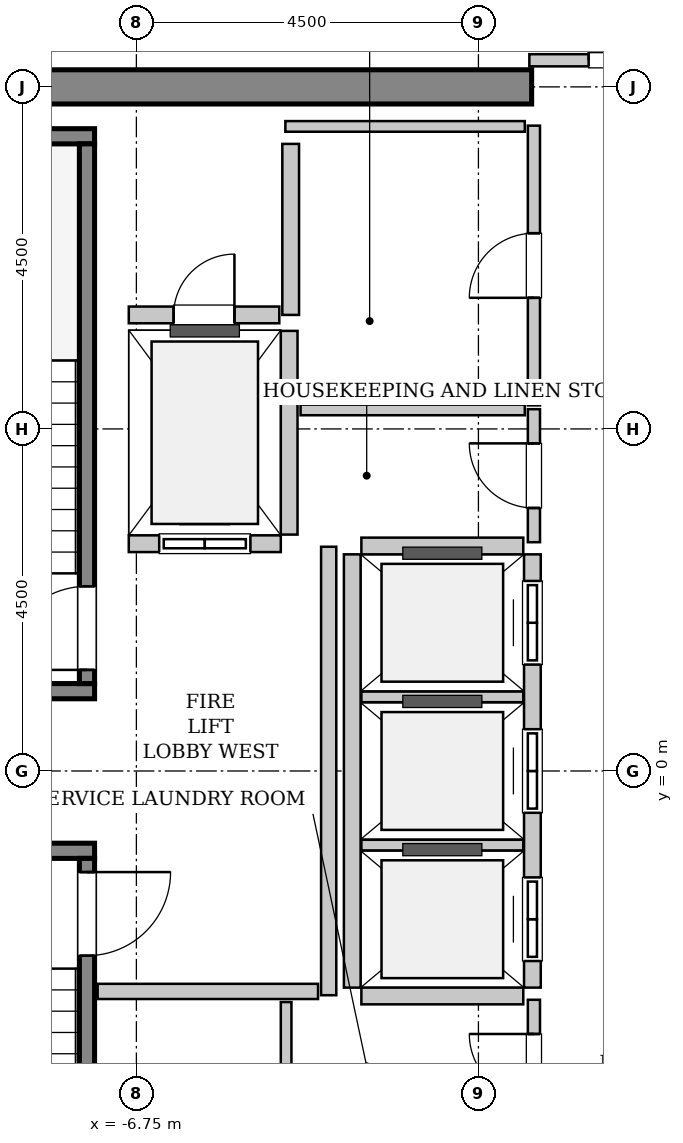
"""IFC4 building model, lengths in metres.
Left out: names, types, materials, properties, quantities, classifications, styles, units other than length and angle.
Written with IfcOpenShell. Run it as: python <this file> out.ifc"""

import sys

from ifc_helpers import new_model, si_unit, direction, frame, frame_2d, origin, place, context, subcontext, project, spatial, rectangle, extrude, source, transform, mapped, element, fill, save


model = new_model("IFC4")
c1 = context("Model", 3, precision=1e-05, world=origin(), true_north=direction((0.0, 1.0)))
c2 = subcontext(c1, "Body", "Model", "MODEL_VIEW")
j1 = project(units=[si_unit("LENGTHUNIT", "METRE"), si_unit("PLANEANGLEUNIT", "RADIAN")], contexts=[c1])
p1 = place(None, origin())
s1 = spatial("IfcSite", under=j1, at=p1, CompositionType="ELEMENT")
p2 = place(p1, origin())
s2 = spatial("IfcBuilding", under=s1, at=p2, CompositionType="ELEMENT")
p3 = place(p2, frame((0.0, 0.0, 314.0)))
s3 = spatial("IfcBuildingStorey", under=s2, at=p3, CompositionType="ELEMENT", Elevation=314.0)
m1 = source(origin(), c2, "Body", "SweptSolid", [
    extrude(rectangle(XDim=9.925, YDim=0.45, at=frame_2d((4.962, 0.0))), origin(), (0.0, 0.0, 1.0), 3.8),
])
p4 = place(p3, frame((-11.475, 9.0, 0.0), z_axis=(0.0, 0.0, 1.0), x_axis=(1.0, 0.0, 0.0)))
e1 = element("IfcWall", 1, at=p4, inside=s3, PredefinedType="SHEAR", context=c2, shape_type="MappedRepresentation", body=[
    mapped(m1, transform((0.0, 0.0, 0.0), x_axis=(1.0, 0.0, 0.0), y_axis=(0.0, 1.0, 0.0), z_axis=(0.0, 0.0, 1.0), scale=1.0)),
])
m2 = source(origin(), c2, "Body", "SweptSolid", [
    extrude(rectangle(XDim=3.4, YDim=0.2, at=frame_2d((1.7, 0.0))), origin(), (0.0, 0.0, 1.0), 3.8),
])
p5 = place(p3, frame((-7.3, 1.05, 0.0), z_axis=(0.0, 0.0, 1.0), x_axis=(-1.0, 0.0, 0.0)))
e2 = element("IfcWall", 2, at=p5, inside=s3, PredefinedType="SOLIDWALL", context=c2, shape_type="MappedRepresentation", body=[
    mapped(m2, transform((0.0, 0.0, 0.0), x_axis=(1.0, 0.0, 0.0), y_axis=(0.0, 1.0, 0.0), z_axis=(0.0, 0.0, 1.0), scale=1.0)),
])
m3 = source(origin(), c2, "Body", "SweptSolid", [
    extrude(rectangle(XDim=3.73, YDim=0.2, at=frame_2d((1.865, 0.0))), origin(), (0.0, 0.0, 1.0), 3.8),
])
p6 = place(p3, frame((-7.3, 8.35, 0.0), z_axis=(0.0, 0.0, 1.0), x_axis=(-1.0, 0.0, 0.0)))
e3 = element("IfcWall", 3, at=p6, inside=s3, PredefinedType="SOLIDWALL", context=c2, shape_type="MappedRepresentation", body=[
    mapped(m3, transform((0.0, 0.0, 0.0), x_axis=(1.0, 0.0, 0.0), y_axis=(0.0, 1.0, 0.0), z_axis=(0.0, 0.0, 1.0), scale=1.0)),
])
m4 = source(origin(), c2, "Body", "SweptSolid", [
    extrude(rectangle(XDim=7.1, YDim=0.2, at=frame_2d((3.55, 0.0))), origin(), (0.0, 0.0, 1.0), 3.8),
])
p7 = place(p3, frame((-7.4, 1.15, 0.0), z_axis=(0.0, 0.0, 1.0), x_axis=(0.0, 1.0, 0.0)))
e4 = element("IfcWall", 4, at=p7, inside=s3, PredefinedType="SOLIDWALL", context=c2, shape_type="MappedRepresentation", body=[
    mapped(m4, transform((0.0, 0.0, 0.0), x_axis=(1.0, 0.0, 0.0), y_axis=(0.0, 1.0, 0.0), z_axis=(0.0, 0.0, 1.0), scale=1.0)),
])
p8 = place(p7, frame((0.18, 0.0, 0.0)))
e5 = element("IfcOpeningElement", 5, at=p8, cuts=e4, PredefinedType="OPENING", context=c2, shape_type="SweptSolid", body=[
    extrude(rectangle(XDim=1.1, YDim=2.15, at=frame_2d((0.55, 1.075))), frame((0.0, 0.11, 0.0), z_axis=(0.0, -1.0, 0.0), x_axis=(1.0, 0.0, 0.0)), (0.0, 0.0, 1.0), 0.22),
])
p9 = place(p3, frame((-10.7, -1.05, 0.0), z_axis=(0.0, 0.0, 1.0), x_axis=(1.0, 0.0, 0.0)))
e6 = element("IfcWall", 6, at=p9, inside=s3, PredefinedType="SOLIDWALL", context=c2, shape_type="MappedRepresentation", body=[
    mapped(m2, transform((0.0, 0.0, 0.0), x_axis=(1.0, 0.0, 0.0), y_axis=(0.0, 1.0, 0.0), z_axis=(0.0, 0.0, 1.0), scale=1.0)),
])
p10 = place(p3, frame((-7.4, -1.15, 0.0), z_axis=(0.0, 0.0, 1.0), x_axis=(0.0, -1.0, 0.0)))
e7 = element("IfcWall", 7, at=p10, inside=s3, PredefinedType="SOLIDWALL", context=c2, shape_type="MappedRepresentation", body=[
    mapped(m4, transform((0.0, 0.0, 0.0), x_axis=(1.0, 0.0, 0.0), y_axis=(0.0, 1.0, 0.0), z_axis=(0.0, 0.0, 1.0), scale=1.0)),
])
p11 = place(p10, frame((0.18, 0.0, 0.0)))
e8 = element("IfcOpeningElement", 8, at=p11, cuts=e7, PredefinedType="OPENING", context=c2, shape_type="SweptSolid", body=[
    extrude(rectangle(XDim=1.1, YDim=2.15, at=frame_2d((0.55, 1.075))), frame((0.0, 0.11, 0.0), z_axis=(0.0, -1.0, 0.0), x_axis=(1.0, 0.0, 0.0)), (0.0, 0.0, 1.0), 0.22),
])
m5 = source(origin(), c2, "Body", "SweptSolid", [
    extrude(rectangle(XDim=2.0, YDim=0.22, at=frame_2d((1.0, 0.0))), origin(), (0.0, 0.0, 1.0), 3.485),
])
p12 = place(p3, frame((-6.85, 2.99, 0.0), z_axis=(0.0, 0.0, 1.0), x_axis=(1.0, 0.0, 0.0)))
e9 = element("IfcWall", 9, at=p12, inside=s3, PredefinedType="SOLIDWALL", context=c2, shape_type="MappedRepresentation", body=[
    mapped(m5, transform((0.0, 0.0, 0.0), x_axis=(1.0, 0.0, 0.0), y_axis=(0.0, 1.0, 0.0), z_axis=(0.0, 0.0, 1.0), scale=1.0)),
])
p13 = place(p12, frame((0.4, 0.0, 0.0)))
e10 = element("IfcOpeningElement", 10, at=p13, cuts=e9, PredefinedType="OPENING", context=c2, shape_type="SweptSolid", body=[
    extrude(rectangle(XDim=1.2, YDim=2.2, at=frame_2d((0.6, 1.1))), frame((0.0, 0.12, 0.0), z_axis=(0.0, -1.0, 0.0), x_axis=(1.0, 0.0, 0.0)), (0.0, 0.0, 1.0), 0.24),
])
m6 = source(origin(), c2, "Body", "SweptSolid", [
    extrude(rectangle(XDim=2.68, YDim=0.22, at=frame_2d((1.34, 0.0))), origin(), (0.0, 0.0, 1.0), 3.485),
])
p14 = place(p3, frame((-4.74, 3.11, 0.0), z_axis=(0.0, 0.0, 1.0), x_axis=(0.0, 1.0, 0.0)))
e11 = element("IfcWall", 11, at=p14, inside=s3, PredefinedType="SOLIDWALL", context=c2, shape_type="MappedRepresentation", body=[
    mapped(m6, transform((0.0, 0.0, 0.0), x_axis=(1.0, 0.0, 0.0), y_axis=(0.0, 1.0, 0.0), z_axis=(0.0, 0.0, 1.0), scale=1.0)),
])
m7 = source(origin(), c2, "Body", "SweptSolid", [
    extrude(rectangle(XDim=5.7, YDim=0.22, at=frame_2d((2.85, 0.0))), origin(), (0.0, 0.0, 1.0), 3.485),
])
p15 = place(p3, frame((-1.54, -2.85, 0.0), z_axis=(0.0, 0.0, 1.0), x_axis=(0.0, 1.0, 0.0)))
e12 = element("IfcWall", 12, at=p15, inside=s3, PredefinedType="SOLIDWALL", context=c2, shape_type="MappedRepresentation", body=[
    mapped(m7, transform((0.0, 0.0, 0.0), x_axis=(1.0, 0.0, 0.0), y_axis=(0.0, 1.0, 0.0), z_axis=(0.0, 0.0, 1.0), scale=1.0)),
])
p16 = place(p15, frame((0.35, 0.0, 0.0)))
e13 = element("IfcOpeningElement", 13, at=p16, cuts=e12, PredefinedType="OPENING", context=c2, shape_type="SweptSolid", body=[
    extrude(rectangle(XDim=1.1, YDim=2.2, at=frame_2d((0.55, 1.1))), frame((0.0, 0.12, 0.0), z_axis=(0.0, -1.0, 0.0), x_axis=(1.0, 0.0, 0.0)), (0.0, 0.0, 1.0), 0.24),
])
p17 = place(p15, frame((2.3, 0.0, 0.0)))
e14 = element("IfcOpeningElement", 14, at=p17, cuts=e12, PredefinedType="OPENING", context=c2, shape_type="SweptSolid", body=[
    extrude(rectangle(XDim=1.1, YDim=2.2, at=frame_2d((0.55, 1.1))), frame((0.0, 0.12, 0.0), z_axis=(0.0, -1.0, 0.0), x_axis=(1.0, 0.0, 0.0)), (0.0, 0.0, 1.0), 0.24),
])
p18 = place(p15, frame((4.25, 0.0, 0.0)))
e15 = element("IfcOpeningElement", 15, at=p18, cuts=e12, PredefinedType="OPENING", context=c2, shape_type="SweptSolid", body=[
    extrude(rectangle(XDim=1.1, YDim=2.2, at=frame_2d((0.55, 1.1))), frame((0.0, 0.12, 0.0), z_axis=(0.0, -1.0, 0.0), x_axis=(1.0, 0.0, 0.0)), (0.0, 0.0, 1.0), 0.24),
])
p19 = place(p3, frame((-3.91, 2.85, 0.0), z_axis=(0.0, 0.0, 1.0), x_axis=(0.0, -1.0, 0.0)))
e16 = element("IfcWall", 16, at=p19, inside=s3, PredefinedType="SOLIDWALL", context=c2, shape_type="MappedRepresentation", body=[
    mapped(m7, transform((0.0, 0.0, 0.0), x_axis=(1.0, 0.0, 0.0), y_axis=(0.0, 1.0, 0.0), z_axis=(0.0, 0.0, 1.0), scale=1.0)),
])
m8 = source(origin(), c2, "Body", "SweptSolid", [
    extrude(rectangle(XDim=2.13, YDim=0.22, at=frame_2d((1.065, 0.0))), origin(), (0.0, 0.0, 1.0), 3.485),
])
p20 = place(p3, frame((-3.79, -2.96, 0.0), z_axis=(0.0, 0.0, 1.0), x_axis=(1.0, 0.0, 0.0)))
e17 = element("IfcWall", 17, at=p20, inside=s3, PredefinedType="SOLIDWALL", context=c2, shape_type="MappedRepresentation", body=[
    mapped(m8, transform((0.0, 0.0, 0.0), x_axis=(1.0, 0.0, 0.0), y_axis=(0.0, 1.0, 0.0), z_axis=(0.0, 0.0, 1.0), scale=1.0)),
])
m9 = source(origin(), c2, "Body", "SweptSolid", [
    extrude(rectangle(XDim=2.13, YDim=0.14, at=frame_2d((1.065, 0.0))), origin(), (0.0, 0.0, 1.0), 3.485),
])
for number, where, z_axis, x_axis in (
    (18, (-3.79, -0.975, 0.0), (0.0, 0.0, 1.0), (1.0, 0.0, 0.0)),
    (19, (-3.79, 0.975, 0.0), (0.0, 0.0, 1.0), (1.0, 0.0, 0.0)),
):
    element("IfcWall", number, at=place(p3, frame(where, z_axis=z_axis, x_axis=x_axis)), inside=s3, PredefinedType="PARTITIONING", context=c2, shape_type="MappedRepresentation", body=[
        mapped(m9, transform((0.0, 0.0, 0.0), x_axis=(1.0, 0.0, 0.0), y_axis=(0.0, 1.0, 0.0), z_axis=(0.0, 0.0, 1.0), scale=1.0)),
    ])
p21 = place(p3, frame((-1.66, 2.96, 0.0), z_axis=(0.0, 0.0, 1.0), x_axis=(-1.0, 0.0, 0.0)))
e20 = element("IfcWall", 20, at=p21, inside=s3, PredefinedType="SOLIDWALL", context=c2, shape_type="MappedRepresentation", body=[
    mapped(m8, transform((0.0, 0.0, 0.0), x_axis=(1.0, 0.0, 0.0), y_axis=(0.0, 1.0, 0.0), z_axis=(0.0, 0.0, 1.0), scale=1.0)),
])
m10 = source(origin(), c2, "Body", "SweptSolid", [
    extrude(rectangle(XDim=2.25, YDim=0.22, at=frame_2d((1.125, 0.0))), origin(), (0.0, 0.0, 1.0), 3.485),
])
p22 = place(p3, frame((-4.72, 6.0, 0.0), z_axis=(0.0, 0.0, 1.0), x_axis=(0.0, 1.0, 0.0)))
e21 = element("IfcWall", 21, at=p22, inside=s3, PredefinedType="SOLIDWALL", context=c2, shape_type="MappedRepresentation", body=[
    mapped(m10, transform((0.0, 0.0, 0.0), x_axis=(1.0, 0.0, 0.0), y_axis=(0.0, 1.0, 0.0), z_axis=(0.0, 0.0, 1.0), scale=1.0)),
])
m11 = source(origin(), c2, "Body", "SweptSolid", [
    extrude(rectangle(XDim=1.98, YDim=0.22, at=frame_2d((0.99, 0.0))), origin(), (0.0, 0.0, 1.0), 3.485),
])
p23 = place(p3, frame((-6.85, 6.0, 0.0), z_axis=(0.0, 0.0, 1.0), x_axis=(1.0, 0.0, 0.0)))
e22 = element("IfcWall", 22, at=p23, inside=s3, PredefinedType="SOLIDWALL", context=c2, shape_type="MappedRepresentation", body=[
    mapped(m11, transform((0.0, 0.0, 0.0), x_axis=(1.0, 0.0, 0.0), y_axis=(0.0, 1.0, 0.0), z_axis=(0.0, 0.0, 1.0), scale=1.0)),
])
p24 = place(p23, frame((0.59, 0.0, 0.0)))
e23 = element("IfcOpeningElement", 23, at=p24, cuts=e22, PredefinedType="OPENING", context=c2, shape_type="SweptSolid", body=[
    extrude(rectangle(XDim=0.8, YDim=2.0, at=frame_2d((0.4, 1.0))), frame((0.0, 0.12, 0.0), z_axis=(0.0, -1.0, 0.0), x_axis=(1.0, 0.0, 0.0)), (0.0, 0.0, 1.0), 0.24),
])
m12 = source(origin(), c2, "Body", "SweptSolid", [
    extrude(rectangle(XDim=5.9, YDim=0.2, at=frame_2d((2.95, 0.0))), origin(), (0.0, 0.0, 1.0), 3.485),
])
p25 = place(p3, frame((-4.22, -2.95, 0.0), z_axis=(0.0, 0.0, 1.0), x_axis=(0.0, 1.0, 0.0)))
e24 = element("IfcWall", 24, at=p25, inside=s3, PredefinedType="PARTITIONING", context=c2, shape_type="MappedRepresentation", body=[
    mapped(m12, transform((0.0, 0.0, 0.0), x_axis=(1.0, 0.0, 0.0), y_axis=(0.0, 1.0, 0.0), z_axis=(0.0, 0.0, 1.0), scale=1.0)),
])
m13 = source(origin(), c2, "Body", "SweptSolid", [
    extrude(rectangle(XDim=2.9, YDim=0.2, at=frame_2d((1.45, 0.0))), origin(), (0.0, 0.0, 1.0), 3.485),
])
p26 = place(p3, frame((-7.26, -2.9, 0.0), z_axis=(0.0, 0.0, 1.0), x_axis=(1.0, 0.0, 0.0)))
e25 = element("IfcWall", 25, at=p26, inside=s3, PredefinedType="PARTITIONING", context=c2, shape_type="MappedRepresentation", body=[
    mapped(m13, transform((0.0, 0.0, 0.0), x_axis=(1.0, 0.0, 0.0), y_axis=(0.0, 1.0, 0.0), z_axis=(0.0, 0.0, 1.0), scale=1.0)),
])
m14 = source(origin(), c2, "Body", "SweptSolid", [
    extrude(rectangle(XDim=3.16, YDim=0.16, at=frame_2d((1.58, 0.0))), origin(), (0.0, 0.0, 1.0), 2.575),
])
p27 = place(p3, frame((-1.58, 9.35, 0.0), z_axis=(0.0, 0.0, 1.0), x_axis=(1.0, 0.0, 0.0)))
e26 = element("IfcWall", 26, at=p27, inside=s3, PredefinedType="PARTITIONING", context=c2, shape_type="MappedRepresentation", body=[
    mapped(m14, transform((0.0, 0.0, 0.0), x_axis=(1.0, 0.0, 0.0), y_axis=(0.0, 1.0, 0.0), z_axis=(0.0, 0.0, 1.0), scale=1.0)),
])
p28 = place(p27, frame((0.78, 0.0, 0.0)))
e27 = element("IfcOpeningElement", 27, at=p28, cuts=e26, PredefinedType="OPENING", context=c2, shape_type="SweptSolid", body=[
    extrude(rectangle(XDim=1.6, YDim=2.3, at=frame_2d((0.8, 1.15))), frame((0.0, 0.09, 0.0), z_axis=(0.0, -1.0, 0.0), x_axis=(1.0, 0.0, 0.0)), (0.0, 0.0, 1.0), 0.18),
])
m15 = source(origin(), c2, "Body", "SweptSolid", [
    extrude(rectangle(XDim=1.75, YDim=0.16, at=frame_2d((0.875, 0.0))), origin(), (0.0, 0.0, 1.0), 3.485),
])
p29 = place(p3, frame((-1.52, 3.01, 0.0), z_axis=(0.0, 0.0, 1.0), x_axis=(0.0, 1.0, 0.0)))
e28 = element("IfcWall", 28, at=p29, inside=s3, PredefinedType="PARTITIONING", context=c2, shape_type="MappedRepresentation", body=[
    mapped(m15, transform((0.0, 0.0, 0.0), x_axis=(1.0, 0.0, 0.0), y_axis=(0.0, 1.0, 0.0), z_axis=(0.0, 0.0, 1.0), scale=1.0)),
])
p30 = place(p29, frame((0.45, 0.0, 0.0)))
e29 = element("IfcOpeningElement", 29, at=p30, cuts=e28, PredefinedType="OPENING", context=c2, shape_type="SweptSolid", body=[
    extrude(rectangle(XDim=0.85, YDim=2.1, at=frame_2d((0.425, 1.05))), frame((0.0, 0.09, 0.0), z_axis=(0.0, -1.0, 0.0), x_axis=(1.0, 0.0, 0.0)), (0.0, 0.0, 1.0), 0.18),
])
m16 = source(origin(), c2, "Body", "SweptSolid", [
    extrude(rectangle(XDim=2.95, YDim=0.14, at=frame_2d((1.475, 0.0))), origin(), (0.0, 0.0, 1.0), 3.485),
])
p31 = place(p3, frame((-4.59, 4.75, 0.0), z_axis=(0.0, 0.0, 1.0), x_axis=(1.0, 0.0, 0.0)))
e30 = element("IfcWall", 30, at=p31, inside=s3, PredefinedType="PARTITIONING", context=c2, shape_type="MappedRepresentation", body=[
    mapped(m16, transform((0.0, 0.0, 0.0), x_axis=(1.0, 0.0, 0.0), y_axis=(0.0, 1.0, 0.0), z_axis=(0.0, 0.0, 1.0), scale=1.0)),
])
m17 = source(origin(), c2, "Body", "SweptSolid", [
    extrude(rectangle(XDim=3.68, YDim=0.16, at=frame_2d((1.84, 0.0))), origin(), (0.0, 0.0, 1.0), 3.485),
])
p32 = place(p3, frame((-1.52, 4.81, 0.0), z_axis=(0.0, 0.0, 1.0), x_axis=(0.0, 1.0, 0.0)))
e31 = element("IfcWall", 31, at=p32, inside=s3, PredefinedType="PARTITIONING", context=c2, shape_type="MappedRepresentation", body=[
    mapped(m17, transform((0.0, 0.0, 0.0), x_axis=(1.0, 0.0, 0.0), y_axis=(0.0, 1.0, 0.0), z_axis=(0.0, 0.0, 1.0), scale=1.0)),
])
p33 = place(p32, frame((1.415, 0.0, 0.0)))
e32 = element("IfcOpeningElement", 32, at=p33, cuts=e31, PredefinedType="OPENING", context=c2, shape_type="SweptSolid", body=[
    extrude(rectangle(XDim=0.85, YDim=2.1, at=frame_2d((0.425, 1.05))), frame((0.0, 0.09, 0.0), z_axis=(0.0, -1.0, 0.0), x_axis=(1.0, 0.0, 0.0)), (0.0, 0.0, 1.0), 0.18),
])
m18 = source(origin(), c2, "Body", "SweptSolid", [
    extrude(rectangle(XDim=3.15, YDim=0.14, at=frame_2d((1.575, 0.0))), origin(), (0.0, 0.0, 1.0), 3.485),
])
p34 = place(p3, frame((-4.79, 8.48, 0.0), z_axis=(0.0, 0.0, 1.0), x_axis=(1.0, 0.0, 0.0)))
e33 = element("IfcWall", 33, at=p34, inside=s3, PredefinedType="PARTITIONING", context=c2, shape_type="MappedRepresentation", body=[
    mapped(m18, transform((0.0, 0.0, 0.0), x_axis=(1.0, 0.0, 0.0), y_axis=(0.0, 1.0, 0.0), z_axis=(0.0, 0.0, 1.0), scale=1.0)),
])
p35 = place(p3, frame((-1.52, -4.76, 0.0), z_axis=(0.0, 0.0, 1.0), x_axis=(0.0, 1.0, 0.0)))
e34 = element("IfcWall", 34, at=p35, inside=s3, PredefinedType="PARTITIONING", context=c2, shape_type="MappedRepresentation", body=[
    mapped(m15, transform((0.0, 0.0, 0.0), x_axis=(1.0, 0.0, 0.0), y_axis=(0.0, 1.0, 0.0), z_axis=(0.0, 0.0, 1.0), scale=1.0)),
])
p36 = place(p35, frame((0.45, 0.0, 0.0)))
e35 = element("IfcOpeningElement", 35, at=p36, cuts=e34, PredefinedType="OPENING", context=c2, shape_type="SweptSolid", body=[
    extrude(rectangle(XDim=0.85, YDim=2.1, at=frame_2d((0.425, 1.05))), frame((0.0, 0.09, 0.0), z_axis=(0.0, -1.0, 0.0), x_axis=(1.0, 0.0, 0.0)), (0.0, 0.0, 1.0), 0.18),
])
m19 = source(origin(), c2, "Body", "SweptSolid", [
    extrude(rectangle(XDim=1.6, YDim=0.14, at=frame_2d((0.8, 0.0))), origin(), (0.0, 0.0, 1.0), 3.485),
])
p37 = place(p3, frame((-4.78, -4.64, 0.0), z_axis=(0.0, 0.0, 1.0), x_axis=(0.0, 1.0, 0.0)))
e36 = element("IfcWall", 36, at=p37, inside=s3, PredefinedType="PARTITIONING", context=c2, shape_type="MappedRepresentation", body=[
    mapped(m19, transform((0.0, 0.0, 0.0), x_axis=(1.0, 0.0, 0.0), y_axis=(0.0, 1.0, 0.0), z_axis=(0.0, 0.0, 1.0), scale=1.0)),
])
m20 = source(origin(), c2, "Body", "SweptSolid", [
    extrude(rectangle(XDim=1.1, YDim=2.15, at=frame_2d((0.55, 1.075))), frame((0.0, 0.025, 0.0), z_axis=(0.0, -1.0, 0.0), x_axis=(1.0, 0.0, 0.0)), (0.0, 0.0, 1.0), 0.05),
])
p38 = place(p8, origin())
e37 = element("IfcDoor", 37, at=p38, inside=s3, OperationType="SINGLE_SWING_LEFT", PredefinedType="DOOR", context=c2, shape_type="MappedRepresentation", body=[
    mapped(m20, transform((0.0, 0.0, 0.0), x_axis=(1.0, 0.0, 0.0), y_axis=(0.0, 1.0, 0.0), z_axis=(0.0, 0.0, 1.0), scale=1.0)),
])
fill(e5, e37)
p39 = place(p11, origin())
e38 = element("IfcDoor", 38, at=p39, inside=s3, OperationType="SINGLE_SWING_LEFT", PredefinedType="DOOR", context=c2, shape_type="MappedRepresentation", body=[
    mapped(m20, transform((0.0, 0.0, 0.0), x_axis=(1.0, 0.0, 0.0), y_axis=(0.0, 1.0, 0.0), z_axis=(0.0, 0.0, 1.0), scale=1.0)),
])
fill(e8, e38)
m21 = source(origin(), c2, "Body", "SweptSolid", [
    extrude(rectangle(XDim=1.2, YDim=2.2, at=frame_2d((0.6, 1.1))), frame((0.0, 0.025, 0.0), z_axis=(0.0, -1.0, 0.0), x_axis=(1.0, 0.0, 0.0)), (0.0, 0.0, 1.0), 0.05),
])
p40 = place(p13, origin())
e39 = element("IfcDoor", 39, at=p40, inside=s3, OperationType="SLIDING_TO_LEFT", PredefinedType="DOOR", context=c2, shape_type="MappedRepresentation", body=[
    mapped(m21, transform((0.0, 0.0, 0.0), x_axis=(1.0, 0.0, 0.0), y_axis=(0.0, 1.0, 0.0), z_axis=(0.0, 0.0, 1.0), scale=1.0)),
])
fill(e10, e39)
m22 = source(origin(), c2, "Body", "SweptSolid", [
    extrude(rectangle(XDim=1.1, YDim=2.2, at=frame_2d((0.55, 1.1))), frame((0.0, 0.025, 0.0), z_axis=(0.0, -1.0, 0.0), x_axis=(1.0, 0.0, 0.0)), (0.0, 0.0, 1.0), 0.05),
])
p41 = place(p16, origin())
e40 = element("IfcDoor", 40, at=p41, inside=s3, OperationType="DOUBLE_DOOR_SLIDING", PredefinedType="DOOR", context=c2, shape_type="MappedRepresentation", body=[
    mapped(m22, transform((0.0, 0.0, 0.0), x_axis=(1.0, 0.0, 0.0), y_axis=(0.0, 1.0, 0.0), z_axis=(0.0, 0.0, 1.0), scale=1.0)),
])
fill(e13, e40)
p42 = place(p17, origin())
e41 = element("IfcDoor", 41, at=p42, inside=s3, OperationType="DOUBLE_DOOR_SLIDING", PredefinedType="DOOR", context=c2, shape_type="MappedRepresentation", body=[
    mapped(m22, transform((0.0, 0.0, 0.0), x_axis=(1.0, 0.0, 0.0), y_axis=(0.0, 1.0, 0.0), z_axis=(0.0, 0.0, 1.0), scale=1.0)),
])
fill(e14, e41)
p43 = place(p18, origin())
e42 = element("IfcDoor", 42, at=p43, inside=s3, OperationType="DOUBLE_DOOR_SLIDING", PredefinedType="DOOR", context=c2, shape_type="MappedRepresentation", body=[
    mapped(m22, transform((0.0, 0.0, 0.0), x_axis=(1.0, 0.0, 0.0), y_axis=(0.0, 1.0, 0.0), z_axis=(0.0, 0.0, 1.0), scale=1.0)),
])
fill(e15, e42)
m23 = source(origin(), c2, "Body", "SweptSolid", [
    extrude(rectangle(XDim=0.8, YDim=2.0, at=frame_2d((0.4, 1.0))), frame((0.0, 0.025, 0.0), z_axis=(0.0, -1.0, 0.0), x_axis=(1.0, 0.0, 0.0)), (0.0, 0.0, 1.0), 0.05),
])
p44 = place(p24, origin())
e43 = element("IfcDoor", 43, at=p44, inside=s3, OperationType="SINGLE_SWING_RIGHT", PredefinedType="TRAPDOOR", context=c2, shape_type="MappedRepresentation", body=[
    mapped(m23, transform((0.0, 0.0, 0.0), x_axis=(1.0, 0.0, 0.0), y_axis=(0.0, 1.0, 0.0), z_axis=(0.0, 0.0, 1.0), scale=1.0)),
])
fill(e23, e43)
m24 = source(origin(), c2, "Body", "SweptSolid", [
    extrude(rectangle(XDim=1.6, YDim=2.3, at=frame_2d((0.8, 1.15))), frame((0.0, 0.025, 0.0), z_axis=(0.0, -1.0, 0.0), x_axis=(1.0, 0.0, 0.0)), (0.0, 0.0, 1.0), 0.05),
])
p45 = place(p28, origin())
e44 = element("IfcDoor", 44, at=p45, inside=s3, OperationType="DOUBLE_DOOR_SINGLE_SWING", PredefinedType="DOOR", context=c2, shape_type="MappedRepresentation", body=[
    mapped(m24, transform((0.0, 0.0, 0.0), x_axis=(1.0, 0.0, 0.0), y_axis=(0.0, 1.0, 0.0), z_axis=(0.0, 0.0, 1.0), scale=1.0)),
])
fill(e27, e44)
m25 = source(origin(), c2, "Body", "SweptSolid", [
    extrude(rectangle(XDim=0.85, YDim=2.1, at=frame_2d((0.425, 1.05))), frame((0.0, 0.025, 0.0), z_axis=(0.0, -1.0, 0.0), x_axis=(1.0, 0.0, 0.0)), (0.0, 0.0, 1.0), 0.05),
])
p46 = place(p30, origin())
e45 = element("IfcDoor", 45, at=p46, inside=s3, OperationType="SINGLE_SWING_RIGHT", PredefinedType="DOOR", context=c2, shape_type="MappedRepresentation", body=[
    mapped(m25, transform((0.0, 0.0, 0.0), x_axis=(1.0, 0.0, 0.0), y_axis=(0.0, 1.0, 0.0), z_axis=(0.0, 0.0, 1.0), scale=1.0)),
])
fill(e29, e45)
p47 = place(p33, origin())
e46 = element("IfcDoor", 46, at=p47, inside=s3, OperationType="SINGLE_SWING_LEFT", PredefinedType="DOOR", context=c2, shape_type="MappedRepresentation", body=[
    mapped(m25, transform((0.0, 0.0, 0.0), x_axis=(1.0, 0.0, 0.0), y_axis=(0.0, 1.0, 0.0), z_axis=(0.0, 0.0, 1.0), scale=1.0)),
])
fill(e32, e46)
p48 = place(p36, origin())
e47 = element("IfcDoor", 47, at=p48, inside=s3, OperationType="SINGLE_SWING_RIGHT", PredefinedType="DOOR", context=c2, shape_type="MappedRepresentation", body=[
    mapped(m25, transform((0.0, 0.0, 0.0), x_axis=(1.0, 0.0, 0.0), y_axis=(0.0, 1.0, 0.0), z_axis=(0.0, 0.0, 1.0), scale=1.0)),
])
fill(e35, e47)
save(model, sys.argv[1])
